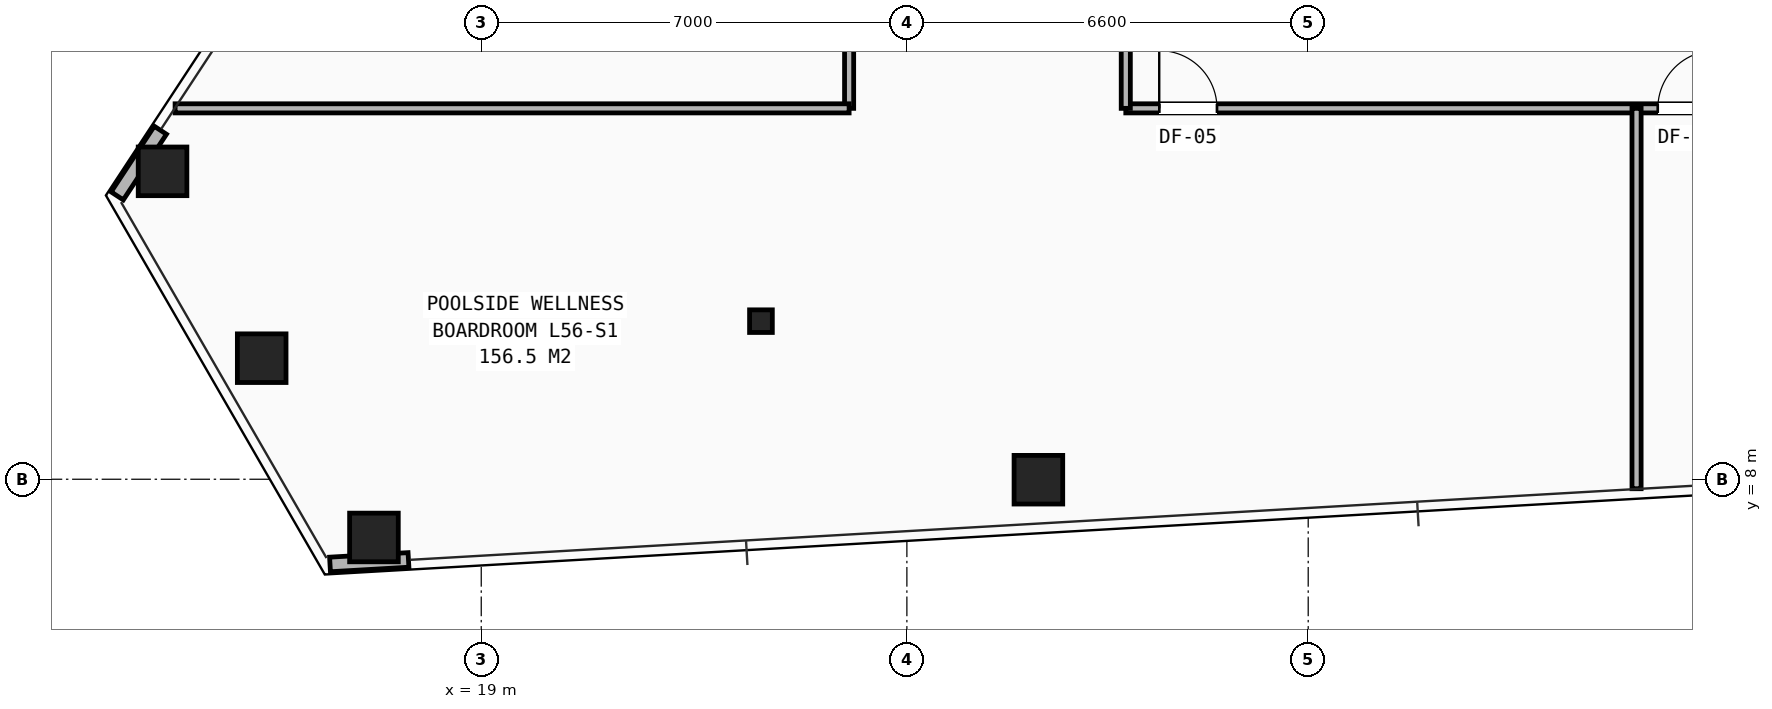
"""IFC4 building model, lengths in metres.
Left out: names, types, materials, properties, quantities, classifications, styles, units other than length and angle.
Written with IfcOpenShell. Run it as: python <this file> out.ifc"""

import sys

from ifc_helpers import new_model, si_unit, direction, frame, frame_2d, origin, origin_2d, place, context, subcontext, project, spatial, rectangle, hollow_rectangle, i_section, extrude, element, fill, save


model = new_model("IFC4")
c1 = context("Model", 3, precision=1e-05, world=origin(), true_north=direction((0.0, 1.0)))
c2 = subcontext(c1, "Body", "Model", "MODEL_VIEW")
j1 = project(units=[si_unit("LENGTHUNIT", "METRE"), si_unit("PLANEANGLEUNIT", "RADIAN")], contexts=[c1])
p1 = place(None, origin())
s1 = spatial("IfcSite", under=j1, at=p1, CompositionType="ELEMENT")
p2 = place(p1, origin())
s2 = spatial("IfcBuilding", under=s1, at=p2, CompositionType="ELEMENT")
p3 = place(p2, frame((0.0, 0.0, 196.5)))
s3 = spatial("IfcBuildingStorey", under=s2, at=p3, CompositionType="ELEMENT", Elevation=196.5)
p4 = place(p3, frame((23.6, 10.6, 0.0), z_axis=(0.0, 0.0, 1.0), x_axis=(1.0, 0.0, 0.0)))
e1 = element("IfcColumn", 1, at=p4, inside=s3, PredefinedType="COLUMN", context=c2, shape_type="SweptSolid", body=[
    extrude(i_section(OverallWidth=0.374, OverallDepth=0.372, WebThickness=0.016, FlangeThickness=0.026, at=origin_2d()), origin(), (0.0, 0.0, 1.0), 4.2),
])
for number, where, z_axis, x_axis in (
    (2, (13.759, 13.064, 0.0), (0.0, 0.0, 1.0), (1.0, 0.0, 0.0)),
    (3, (15.389, 9.991, 0.0), (0.0, 0.0, 1.0), (1.0, 0.0, 0.0)),
    (4, (17.236, 7.042, 0.0), (0.0, 0.0, 1.0), (1.0, 0.0, 0.0)),
    (5, (28.163, 7.992, 0.0), (0.0, 0.0, 1.0), (1.0, 0.0, 0.0)),
):
    element("IfcColumn", number, at=place(p3, frame(where, z_axis=z_axis, x_axis=x_axis)), inside=s3, PredefinedType="COLUMN", context=c2, shape_type="SweptSolid", body=[
        extrude(hollow_rectangle(XDim=0.8, YDim=0.8, WallThickness=0.055, at=origin_2d()), origin(), (0.0, 0.0, 1.0), 4.2),
    ])
for number, where, z_axis, x_axis in (
    (6, (13.723, 13.74, 0.0), (0.0, 0.0, 1.0), (-0.549, -0.836, 0.0)),
    (7, (16.513, 6.598, 0.0), (0.0, 0.0, 1.0), (0.998, 0.058, 0.0)),
):
    element("IfcWall", number, at=place(p3, frame(where, z_axis=z_axis, x_axis=x_axis)), inside=s3, PredefinedType="SHEAR", context=c2, shape_type="SweptSolid", body=[
        extrude(rectangle(XDim=1.292, YDim=0.24, at=frame_2d((0.646, 0.0))), origin(), (0.0, 0.0, 1.0), 3.313),
    ])
p5 = place(p3, frame((29.6, 14.1, 0.0), z_axis=(0.0, 0.0, 1.0), x_axis=(1.0, 0.0, 0.0)))
e8 = element("IfcWall", 8, at=p5, inside=s3, PredefinedType="PARTITIONING", context=c2, shape_type="SweptSolid", body=[
    extrude(rectangle(XDim=18.6, YDim=0.15, at=frame_2d((9.3, 0.0))), origin(), (0.0, 0.0, 1.0), 3.051),
])
p6 = place(p5, frame((0.55, 0.0, 0.0)))
e9 = element("IfcOpeningElement", 9, at=p6, cuts=e8, PredefinedType="OPENING", context=c2, shape_type="SweptSolid", body=[
    extrude(rectangle(XDim=0.95, YDim=2.1, at=frame_2d((0.475, 1.05))), frame((0.0, 0.085, 0.0), z_axis=(0.0, -1.0, 0.0), x_axis=(1.0, 0.0, 0.0)), (0.0, 0.0, 1.0), 0.17),
])
p7 = place(p5, frame((8.75, 0.0, 0.0)))
e10 = element("IfcOpeningElement", 10, at=p7, cuts=e8, PredefinedType="OPENING", context=c2, shape_type="SweptSolid", body=[
    extrude(rectangle(XDim=0.95, YDim=2.1, at=frame_2d((0.475, 1.05))), frame((0.0, 0.085, 0.0), z_axis=(0.0, -1.0, 0.0), x_axis=(1.0, 0.0, 0.0)), (0.0, 0.0, 1.0), 0.17),
])
p8 = place(p3, frame((29.6, 14.1, 0.0), z_axis=(0.0, 0.0, 1.0), x_axis=(0.0, 1.0, 0.0)))
e11 = element("IfcWall", 11, at=p8, inside=s3, PredefinedType="PARTITIONING", context=c2, shape_type="SweptSolid", body=[
    extrude(rectangle(XDim=8.7, YDim=0.15, at=frame_2d((4.35, 0.0))), origin(), (0.0, 0.0, 1.0), 3.94),
])
p9 = place(p8, frame((2.65, 0.0, 0.0)))
e12 = element("IfcOpeningElement", 12, at=p9, cuts=e11, PredefinedType="OPENING", context=c2, shape_type="SweptSolid", body=[
    extrude(rectangle(XDim=0.85, YDim=2.05, at=frame_2d((0.425, 1.025))), frame((0.0, 0.085, 0.0), z_axis=(0.0, -1.0, 0.0), x_axis=(1.0, 0.0, 0.0)), (0.0, 0.0, 1.0), 0.17),
])
p10 = place(p8, frame((4.75, 0.0, 0.0)))
e13 = element("IfcOpeningElement", 13, at=p10, cuts=e11, PredefinedType="OPENING", context=c2, shape_type="SweptSolid", body=[
    extrude(rectangle(XDim=0.85, YDim=2.05, at=frame_2d((0.425, 1.025))), frame((0.0, 0.085, 0.0), z_axis=(0.0, -1.0, 0.0), x_axis=(1.0, 0.0, 0.0)), (0.0, 0.0, 1.0), 0.17),
])
p11 = place(p8, frame((6.85, 0.0, 0.0)))
e14 = element("IfcOpeningElement", 14, at=p11, cuts=e11, PredefinedType="OPENING", context=c2, shape_type="SweptSolid", body=[
    extrude(rectangle(XDim=0.85, YDim=2.05, at=frame_2d((0.425, 1.025))), frame((0.0, 0.085, 0.0), z_axis=(0.0, -1.0, 0.0), x_axis=(1.0, 0.0, 0.0)), (0.0, 0.0, 1.0), 0.17),
])
p12 = place(p3, frame((25.05, 14.1, 0.0), z_axis=(0.0, 0.0, 1.0), x_axis=(0.0, 1.0, 0.0)))
e15 = element("IfcWall", 15, at=p12, inside=s3, PredefinedType="PARTITIONING", context=c2, shape_type="SweptSolid", body=[
    extrude(rectangle(XDim=8.7, YDim=0.15, at=frame_2d((4.35, 0.0))), origin(), (0.0, 0.0, 1.0), 3.523),
])
p13 = place(p3, frame((38.0, 7.844, 0.0), z_axis=(0.0, 0.0, 1.0), x_axis=(0.0, 1.0, 0.0)))
e16 = element("IfcWall", 16, at=p13, inside=s3, PredefinedType="PARTITIONING", context=c2, shape_type="SweptSolid", body=[
    extrude(rectangle(XDim=6.256, YDim=0.15, at=frame_2d((3.128, 0.0))), origin(), (0.0, 0.0, 1.0), 3.051),
])
p14 = place(p3, frame((13.965, 14.1, 0.0), z_axis=(0.0, 0.0, 1.0), x_axis=(1.0, 0.0, 0.0)))
e17 = element("IfcWall", 17, at=p14, inside=s3, PredefinedType="PARTITIONING", context=c2, shape_type="SweptSolid", body=[
    extrude(rectangle(XDim=11.085, YDim=0.15, at=frame_2d((5.542, 0.0))), origin(), (0.0, 0.0, 1.0), 2.955),
])
p15 = place(p6, origin())
e18 = element("IfcDoor", 18, at=p15, inside=s3, OperationType="SINGLE_SWING_LEFT", PredefinedType="DOOR", context=c2, shape_type="SweptSolid", body=[
    extrude(rectangle(XDim=0.95, YDim=2.1, at=frame_2d((0.475, 1.05))), frame((0.0, 0.025, 0.0), z_axis=(0.0, -1.0, 0.0), x_axis=(1.0, 0.0, 0.0)), (0.0, 0.0, 1.0), 0.05),
])
fill(e9, e18)
p16 = place(p7, origin())
e19 = element("IfcDoor", 19, at=p16, inside=s3, OperationType="SINGLE_SWING_RIGHT", PredefinedType="DOOR", context=c2, shape_type="SweptSolid", body=[
    extrude(rectangle(XDim=0.95, YDim=2.1, at=frame_2d((0.475, 1.05))), frame((0.0, 0.025, 0.0), z_axis=(0.0, -1.0, 0.0), x_axis=(1.0, 0.0, 0.0)), (0.0, 0.0, 1.0), 0.05),
])
fill(e10, e19)
save(model, sys.argv[1])
